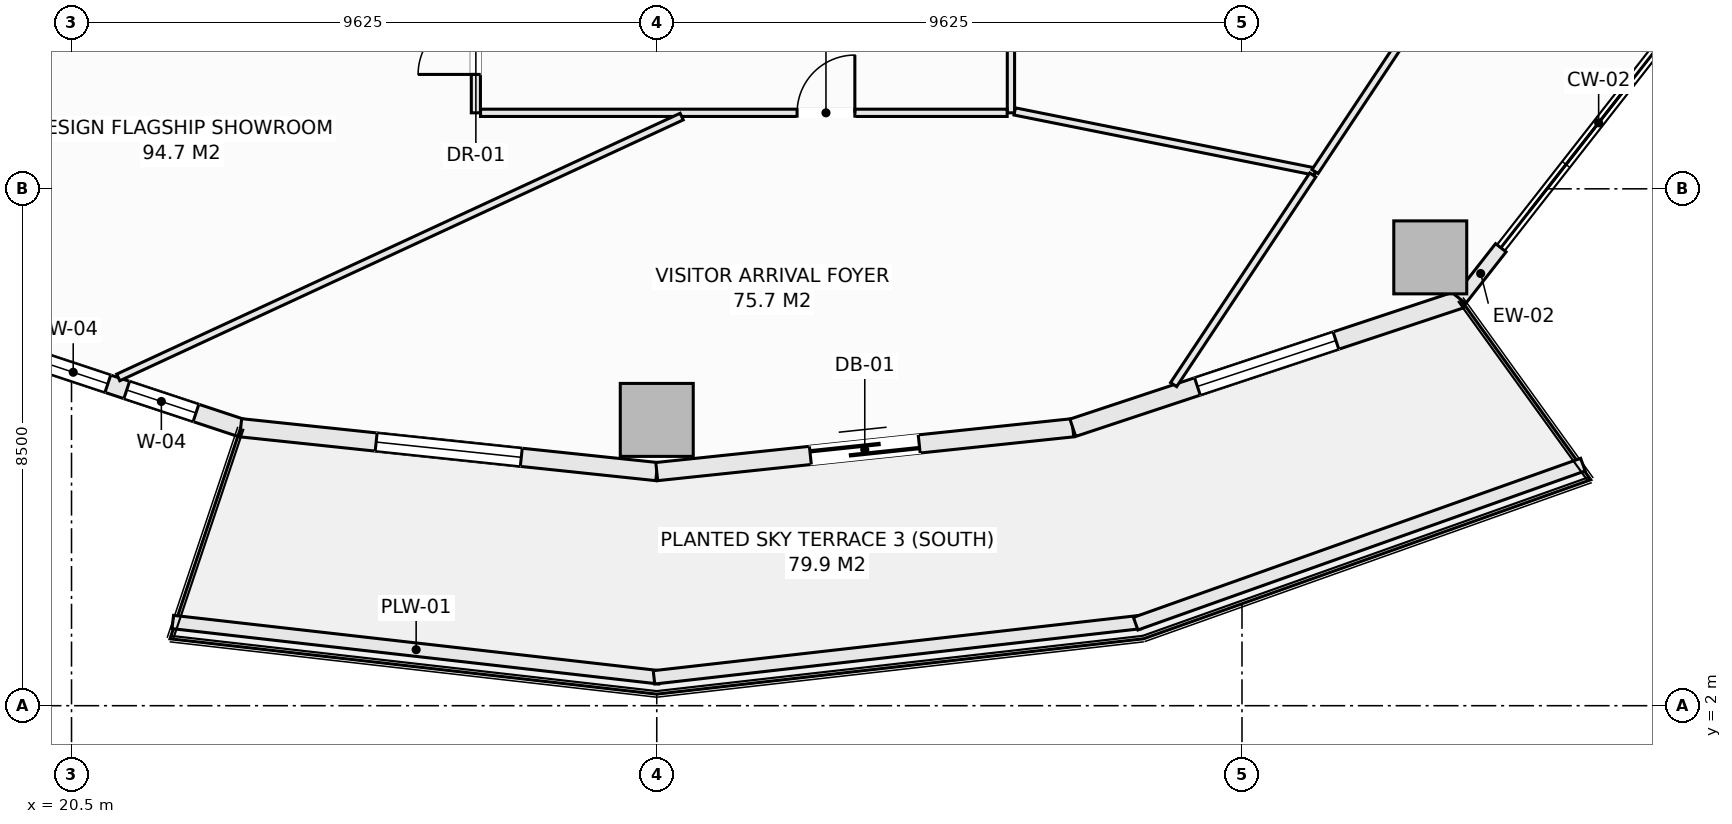
"""IFC4 building model, lengths in metres.
Left out: names, types, materials, properties, quantities, classifications, styles, units other than length and angle.
Written with IfcOpenShell. Run it as: python <this file> out.ifc"""

import sys

from ifc_helpers import new_model, si_unit, direction, frame, frame_2d, origin, origin_2d, place, context, subcontext, project, spatial, rectangle, extrude, element, fill, save


model = new_model("IFC4")
c1 = context("Model", 3, precision=1e-05, world=origin(), true_north=direction((0.0, 1.0)))
c2 = subcontext(c1, "Body", "Model", "MODEL_VIEW")
j1 = project(units=[si_unit("LENGTHUNIT", "METRE"), si_unit("PLANEANGLEUNIT", "RADIAN")], contexts=[c1])
p1 = place(None, origin())
s1 = spatial("IfcSite", under=j1, at=p1, CompositionType="ELEMENT")
p2 = place(p1, origin())
s2 = spatial("IfcBuilding", under=s1, at=p2, CompositionType="ELEMENT")
p3 = place(p2, frame((0.0, 0.0, 61.15)))
s3 = spatial("IfcBuildingStorey", under=s2, at=p3, CompositionType="ELEMENT", Elevation=61.15)
for number, where, z_axis, x_axis in (
    (1, (30.125, 6.7, -0.28), (0.0, 0.0, 1.0), (1.0, 0.0, 0.0)),
    (2, (42.846, 9.373, -0.28), (0.0, 0.0, 1.0), (1.0, 0.0, 0.0)),
):
    element("IfcColumn", number, at=place(p3, frame(where, z_axis=z_axis, x_axis=x_axis)), inside=s3, PredefinedType="COLUMN", context=c2, shape_type="SweptSolid", body=[
        extrude(rectangle(XDim=1.2, YDim=1.2, at=origin_2d()), origin(), (0.0, 0.0, 1.0), 3.85),
    ])
p4 = place(p3, frame((16.906, 8.684, 0.0), z_axis=(0.0, 0.0, 1.0), x_axis=(0.949245153629, -0.314537181127, 0.0)))
e3 = element("IfcWall", 3, at=p4, inside=s3, PredefinedType="SOLIDWALL", context=c2, shape_type="SweptSolid", body=[
    extrude(rectangle(XDim=6.717, YDim=0.3, at=frame_2d((3.358, 0.0))), origin(), (0.0, 0.0, 1.0), 3.093),
])
p5 = place(p4, frame((3.215, 0.0, 0.85)))
e4 = element("IfcOpeningElement", 4, at=p5, cuts=e3, PredefinedType="OPENING", context=c2, shape_type="SweptSolid", body=[
    extrude(rectangle(XDim=1.2, YDim=1.9, at=frame_2d((0.6, 0.95))), frame((0.0, 0.16, 0.0), z_axis=(0.0, -1.0, 0.0), x_axis=(1.0, 0.0, 0.0)), (0.0, 0.0, 1.0), 0.32),
])
p6 = place(p4, frame((4.742, 0.0, 0.85)))
e5 = element("IfcOpeningElement", 5, at=p6, cuts=e3, PredefinedType="OPENING", context=c2, shape_type="SweptSolid", body=[
    extrude(rectangle(XDim=1.2, YDim=1.9, at=frame_2d((0.6, 0.95))), frame((0.0, 0.16, 0.0), z_axis=(0.0, -1.0, 0.0), x_axis=(1.0, 0.0, 0.0)), (0.0, 0.0, 1.0), 0.32),
])
p7 = place(p3, frame((23.282, 6.571, 0.0), z_axis=(0.0, 0.0, 1.0), x_axis=(0.994498840295, -0.104747585419, 0.0)))
e6 = element("IfcWall", 6, at=p7, inside=s3, PredefinedType="SOLIDWALL", context=c2, shape_type="SweptSolid", body=[
    extrude(rectangle(XDim=6.88, YDim=0.3, at=frame_2d((3.44, 0.0))), origin(), (0.0, 0.0, 1.0), 3.093),
])
p8 = place(p7, frame((2.24, 0.0, 0.85)))
e7 = element("IfcOpeningElement", 7, at=p8, cuts=e6, PredefinedType="OPENING", context=c2, shape_type="SweptSolid", body=[
    extrude(rectangle(XDim=2.4, YDim=1.9, at=frame_2d((1.2, 0.95))), frame((0.0, 0.16, 0.0), z_axis=(0.0, -1.0, 0.0), x_axis=(1.0, 0.0, 0.0)), (0.0, 0.0, 1.0), 0.32),
])
p9 = place(p3, frame((30.125, 5.85, 0.0), z_axis=(0.0, 0.0, 1.0), x_axis=(0.994498840295, 0.104747585419, 0.0)))
e8 = element("IfcWall", 8, at=p9, inside=s3, PredefinedType="SOLIDWALL", context=c2, shape_type="SweptSolid", body=[
    extrude(rectangle(XDim=6.88, YDim=0.3, at=frame_2d((3.44, 0.0))), origin(), (0.0, 0.0, 1.0), 3.093),
])
p10 = place(p9, frame((2.54, 0.0, 0.0)))
e9 = element("IfcOpeningElement", 9, at=p10, cuts=e8, PredefinedType="OPENING", context=c2, shape_type="SweptSolid", body=[
    extrude(rectangle(XDim=1.8, YDim=2.25, at=frame_2d((0.9, 1.125))), frame((0.0, 0.16, 0.0), z_axis=(0.0, -1.0, 0.0), x_axis=(1.0, 0.0, 0.0)), (0.0, 0.0, 1.0), 0.32),
])
p11 = place(p3, frame((36.968, 6.571, 0.0), z_axis=(0.0, 0.0, 1.0), x_axis=(0.949245153629, 0.314537181127, 0.0)))
e10 = element("IfcWall", 10, at=p11, inside=s3, PredefinedType="SOLIDWALL", context=c2, shape_type="SweptSolid", body=[
    extrude(rectangle(XDim=6.717, YDim=0.3, at=frame_2d((3.358, 0.0))), origin(), (0.0, 0.0, 1.0), 3.093),
])
p12 = place(p11, frame((2.159, 0.0, 0.85)))
e11 = element("IfcOpeningElement", 11, at=p12, cuts=e10, PredefinedType="OPENING", context=c2, shape_type="SweptSolid", body=[
    extrude(rectangle(XDim=2.4, YDim=1.9, at=frame_2d((1.2, 0.95))), frame((0.0, 0.16, 0.0), z_axis=(0.0, -1.0, 0.0), x_axis=(1.0, 0.0, 0.0)), (0.0, 0.0, 1.0), 0.32),
])
p13 = place(p3, frame((43.344, 8.684, 0.0), z_axis=(0.0, 0.0, 1.0), x_axis=(0.616387780378, 0.787442762492, 0.0)))
e12 = element("IfcWall", 12, at=p13, inside=s3, PredefinedType="SOLIDWALL", context=c2, shape_type="SweptSolid", body=[
    extrude(rectangle(XDim=1.076, YDim=0.22, at=frame_2d((0.538, 0.0))), origin(), (0.0, 0.0, 1.0), 3.093),
])
for number, where, z_axis, x_axis in (
    (13, (22.166, 3.376, 0.0), (0.0, 0.0, 1.0), (0.994, -0.113, 0.0)),
    (14, (30.08, 2.466, 0.0), (0.0, 0.0, 1.0), (0.994, 0.113, 0.0)),
):
    element("IfcWall", number, at=place(p3, frame(where, z_axis=z_axis, x_axis=x_axis)), inside=s3, PredefinedType="PARAPET", context=c2, shape_type="SweptSolid", body=[
        extrude(rectangle(XDim=8.056, YDim=0.22, at=frame_2d((4.028, 0.0))), origin(), (0.0, 0.0, 1.0), 0.52),
    ])
p14 = place(p3, frame((38.001, 3.349, 0.0), z_axis=(0.0, 0.0, 1.0), x_axis=(0.942203722205, 0.335040513764, 0.0)))
e15 = element("IfcWall", 15, at=p14, inside=s3, PredefinedType="PARAPET", context=c2, shape_type="SweptSolid", body=[
    extrude(rectangle(XDim=7.807, YDim=0.22, at=frame_2d((3.904, 0.0))), origin(), (0.0, 0.0, 1.0), 0.52),
])
p15 = place(p3, frame((27.15, 11.75, 0.0), z_axis=(0.0, 0.0, 1.0), x_axis=(0.0, 1.0, 0.0)))
e16 = element("IfcWall", 16, at=p15, inside=s3, PredefinedType="PARTITIONING", context=c2, shape_type="SweptSolid", body=[
    extrude(rectangle(XDim=5.223, YDim=0.15, at=frame_2d((2.611, 0.0))), origin(), (0.0, 0.0, 1.0), 3.57),
])
p16 = place(p15, frame((0.631, 0.0, 0.0)))
e17 = element("IfcOpeningElement", 17, at=p16, cuts=e16, PredefinedType="OPENING", context=c2, shape_type="SweptSolid", body=[
    extrude(rectangle(XDim=0.95, YDim=2.1, at=frame_2d((0.475, 1.05))), frame((0.0, 0.085, 0.0), z_axis=(0.0, -1.0, 0.0), x_axis=(1.0, 0.0, 0.0)), (0.0, 0.0, 1.0), 0.17),
])
p17 = place(p15, frame((2.828, 0.0, 0.0)))
e18 = element("IfcOpeningElement", 18, at=p17, cuts=e16, PredefinedType="OPENING", context=c2, shape_type="SweptSolid", body=[
    extrude(rectangle(XDim=0.95, YDim=2.1, at=frame_2d((0.475, 1.05))), frame((0.0, 0.085, 0.0), z_axis=(0.0, -1.0, 0.0), x_axis=(1.0, 0.0, 0.0)), (0.0, 0.0, 1.0), 0.17),
])
p18 = place(p3, frame((35.95, 11.75, 0.0), z_axis=(0.0, 0.0, 1.0), x_axis=(0.0, 1.0, 0.0)))
e19 = element("IfcWall", 19, at=p18, inside=s3, PredefinedType="PARTITIONING", context=c2, shape_type="SweptSolid", body=[
    extrude(rectangle(XDim=3.838, YDim=0.12, at=frame_2d((1.919, 0.0))), origin(), (0.0, 0.0, 1.0), 3.57),
])
p19 = place(p3, frame((27.227, 11.75, 0.0), z_axis=(0.0, 0.0, 1.0), x_axis=(1.0, 0.0, 0.0)))
e20 = element("IfcWall", 20, at=p19, inside=s3, PredefinedType="PARTITIONING", context=c2, shape_type="SweptSolid", body=[
    extrude(rectangle(XDim=8.661, YDim=0.12, at=frame_2d((4.331, 0.0))), origin(), (0.0, 0.0, 1.0), 3.57),
])
p20 = place(p19, frame((5.206, 0.0, 0.0)))
e21 = element("IfcOpeningElement", 21, at=p20, cuts=e20, PredefinedType="OPENING", context=c2, shape_type="SweptSolid", body=[
    extrude(rectangle(XDim=0.95, YDim=2.1, at=frame_2d((0.475, 1.05))), frame((0.0, 0.07, 0.0), z_axis=(0.0, -1.0, 0.0), x_axis=(1.0, 0.0, 0.0)), (0.0, 0.0, 1.0), 0.14),
])
p21 = place(p3, frame((36.012, 11.773, 0.0), z_axis=(0.0, 0.0, 1.0), x_axis=(0.980526579604, -0.196386421855, 0.0)))
e22 = element("IfcWall", 22, at=p21, inside=s3, PredefinedType="PARTITIONING", context=c2, shape_type="SweptSolid", body=[
    extrude(rectangle(XDim=5.037, YDim=0.12, at=frame_2d((2.519, 0.0))), origin(), (0.0, 0.0, 1.0), 3.57),
])
p22 = place(p3, frame((21.269, 7.398, 0.0), z_axis=(0.0, 0.0, 1.0), x_axis=(0.907478047532, 0.420099503983, 0.0)))
e23 = element("IfcWall", 23, at=p22, inside=s3, PredefinedType="PARTITIONING", context=c2, shape_type="SweptSolid", body=[
    extrude(rectangle(XDim=10.211, YDim=0.12, at=frame_2d((5.106, 0.0))), origin(), (0.0, 0.0, 1.0), 3.093),
])
p23 = place(p3, frame((38.625, 7.28, 0.0), z_axis=(0.0, 0.0, 1.0), x_axis=(0.553106233715, 0.833110733471, 0.0)))
e24 = element("IfcWall", 24, at=p23, inside=s3, PredefinedType="PARTITIONING", context=c2, shape_type="SweptSolid", body=[
    extrude(rectangle(XDim=4.138, YDim=0.12, at=frame_2d((2.069, 0.0))), origin(), (0.0, 0.0, 1.0), 3.57),
])
p24 = place(p3, frame((40.951, 10.783, 0.0), z_axis=(0.0, 0.0, 1.0), x_axis=(0.553122636923, 0.83309984307, 0.0)))
e25 = element("IfcWall", 25, at=p24, inside=s3, PredefinedType="PARTITIONING", context=c2, shape_type="SweptSolid", body=[
    extrude(rectangle(XDim=9.72, YDim=0.12, at=frame_2d((4.86, 0.0))), origin(), (0.0, 0.0, 1.0), 3.57),
])
p25 = place(p5, origin())
e26 = element("IfcWindow", 26, at=p25, inside=s3, PartitioningType="SINGLE_PANEL", PredefinedType="WINDOW", context=c2, shape_type="SweptSolid", body=[
    extrude(rectangle(XDim=1.2, YDim=1.9, at=frame_2d((0.6, 0.95))), frame((0.0, 0.03, 0.0), z_axis=(0.0, -1.0, 0.0), x_axis=(1.0, 0.0, 0.0)), (0.0, 0.0, 1.0), 0.06),
])
fill(e4, e26)
p26 = place(p8, origin())
e27 = element("IfcWindow", 27, at=p26, inside=s3, PartitioningType="SINGLE_PANEL", PredefinedType="WINDOW", context=c2, shape_type="SweptSolid", body=[
    extrude(rectangle(XDim=2.4, YDim=1.9, at=frame_2d((1.2, 0.95))), frame((0.0, 0.03, 0.0), z_axis=(0.0, -1.0, 0.0), x_axis=(1.0, 0.0, 0.0)), (0.0, 0.0, 1.0), 0.06),
])
fill(e7, e27)
p27 = place(p10, frame((1.8, 0.0, 0.0), z_axis=(0.0, 0.0, 1.0), x_axis=(-1.0, 0.0, 0.0)))
e28 = element("IfcDoor", 28, at=p27, inside=s3, OperationType="SLIDING_TO_LEFT", PredefinedType="DOOR", context=c2, shape_type="SweptSolid", body=[
    extrude(rectangle(XDim=1.8, YDim=2.25, at=frame_2d((0.9, 1.125))), frame((0.0, 0.025, 0.0), z_axis=(0.0, -1.0, 0.0), x_axis=(1.0, 0.0, 0.0)), (0.0, 0.0, 1.0), 0.05),
])
fill(e9, e28)
p28 = place(p12, origin())
e29 = element("IfcWindow", 29, at=p28, inside=s3, PartitioningType="SINGLE_PANEL", PredefinedType="WINDOW", context=c2, shape_type="SweptSolid", body=[
    extrude(rectangle(XDim=2.4, YDim=1.9, at=frame_2d((1.2, 0.95))), frame((0.0, 0.03, 0.0), z_axis=(0.0, -1.0, 0.0), x_axis=(1.0, 0.0, 0.0)), (0.0, 0.0, 1.0), 0.06),
])
fill(e11, e29)
p29 = place(p16, origin())
e30 = element("IfcDoor", 30, at=p29, inside=s3, OperationType="SINGLE_SWING_LEFT", PredefinedType="DOOR", context=c2, shape_type="SweptSolid", body=[
    extrude(rectangle(XDim=0.95, YDim=2.1, at=frame_2d((0.475, 1.05))), frame((0.0, 0.025, 0.0), z_axis=(0.0, -1.0, 0.0), x_axis=(1.0, 0.0, 0.0)), (0.0, 0.0, 1.0), 0.05),
])
fill(e17, e30)
p30 = place(p20, origin())
e31 = element("IfcDoor", 31, at=p30, inside=s3, OperationType="SINGLE_SWING_RIGHT", PredefinedType="DOOR", context=c2, shape_type="SweptSolid", body=[
    extrude(rectangle(XDim=0.95, YDim=2.1, at=frame_2d((0.475, 1.05))), frame((0.0, 0.025, 0.0), z_axis=(0.0, -1.0, 0.0), x_axis=(1.0, 0.0, 0.0)), (0.0, 0.0, 1.0), 0.05),
])
fill(e21, e31)
p31 = place(p6, origin())
e32 = element("IfcWindow", 32, at=p31, inside=s3, PartitioningType="SINGLE_PANEL", PredefinedType="WINDOW", context=c2, shape_type="SweptSolid", body=[
    extrude(rectangle(XDim=1.2, YDim=1.9, at=frame_2d((0.6, 0.95))), frame((0.0, 0.03, 0.0), z_axis=(0.0, -1.0, 0.0), x_axis=(1.0, 0.0, 0.0)), (0.0, 0.0, 1.0), 0.06),
])
fill(e5, e32)
save(model, sys.argv[1])
